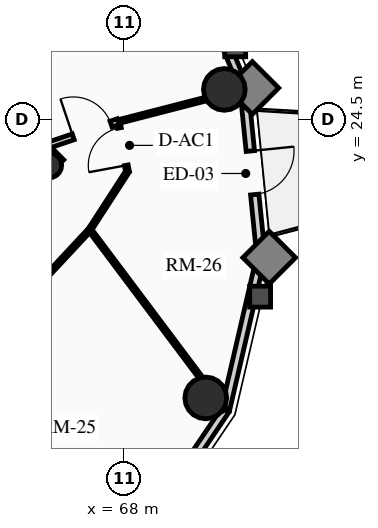
"""IFC4 building model, lengths in metres.
Left out: names, types, materials, properties, quantities, classifications, styles, units other than length and angle.
Written with IfcOpenShell. Run it as: python <this file> out.ifc"""

import sys

from ifc_helpers import new_model, si_unit, direction, frame, frame_2d, origin, origin_2d, place, context, subcontext, project, spatial, rectangle, circle, hollow_circle, extrude, source, transform, mapped, element, fill, save


model = new_model("IFC4")
c1 = context("Model", 3, precision=1e-05, world=origin(), true_north=direction((0.0, 1.0)))
c2 = subcontext(c1, "Body", "Model", "MODEL_VIEW")
j1 = project(units=[si_unit("LENGTHUNIT", "METRE"), si_unit("PLANEANGLEUNIT", "RADIAN")], contexts=[c1])
p1 = place(None, origin())
s1 = spatial("IfcSite", under=j1, at=p1, CompositionType="ELEMENT")
p2 = place(p1, origin())
s2 = spatial("IfcBuilding", under=s1, at=p2, CompositionType="ELEMENT")
p3 = place(p2, frame((0.0, 0.0, 196.66)))
s3 = spatial("IfcBuildingStorey", under=s2, at=p3, CompositionType="ELEMENT", Elevation=196.66)
p4 = place(p3, frame((66.268, 23.298, 0.0), z_axis=(0.0, 0.0, 1.0), x_axis=(-0.707106781187, 0.707106781187, 0.0)))
e1 = element("IfcWall", 1, at=p4, inside=s3, PredefinedType="SHEAR", context=c2, shape_type="SweptSolid", body=[
    extrude(rectangle(XDim=14.1, YDim=0.4, at=frame_2d((7.05, 0.0))), origin(), (0.0, 0.0, 1.0), 2.91),
])
p5 = place(p3, frame((58.561, 15.873, 0.0), z_axis=(0.0, 0.0, 1.0), x_axis=(0.707106781187, 0.707106781187, 0.0)))
e2 = element("IfcWall", 2, at=p5, inside=s3, PredefinedType="SHEAR", context=c2, shape_type="SweptSolid", body=[
    extrude(rectangle(XDim=10.7, YDim=0.4, at=frame_2d((5.35, 0.0))), origin(), (0.0, 0.0, 1.0), 2.91),
])
m1 = source(origin(), c2, "Body", "SweptSolid", [
    extrude(rectangle(XDim=1.5, YDim=2.02, at=frame_2d((0.75, 1.01))), frame((0.0, 0.21, 0.0), z_axis=(0.0, -1.0, 0.0), x_axis=(1.0, 0.0, 0.0)), (0.0, 0.0, 1.0), 0.42),
])
p6 = place(p5, frame((5.45, 0.0, 0.0)))
e3 = element("IfcOpeningElement", 3, at=p6, cuts=e2, PredefinedType="OPENING", context=c2, shape_type="MappedRepresentation", body=[
    mapped(m1, transform((0.0, 0.0, 0.0), x_axis=(1.0, 0.0, 0.0), y_axis=(0.0, 1.0, 0.0), z_axis=(0.0, 0.0, 1.0), scale=1.0)),
])
p7 = place(p3, frame((66.024, 23.294, 0.0), z_axis=(0.0, 0.0, 1.0), x_axis=(0.707106781187, 0.707106781187, 0.0)))
e4 = element("IfcColumn", 4, at=p7, inside=s3, PredefinedType="COLUMN", context=c2, shape_type="SweptSolid", body=[
    extrude(hollow_circle(Radius=0.33, WallThickness=0.025, at=origin_2d()), origin(), (0.0, 0.0, 1.0), 2.91),
])
for number, where, z_axis, x_axis in (
    (5, (70.146, 17.173, 0.0), (0.0, 0.0, 1.0), (1.0, 0.0, 0.0)),
    (6, (70.635, 25.291, 0.0), (0.0, 0.0, 1.0), (1.0, 0.0, 0.0)),
):
    element("IfcColumn", number, at=place(p3, frame(where, z_axis=z_axis, x_axis=x_axis)), inside=s3, PredefinedType="USERDEFINED", context=c2, shape_type="SweptSolid", body=[
        extrude(circle(Radius=0.55, at=origin_2d()), origin(), (0.0, 0.0, 1.0), 2.91),
    ])
p8 = place(p3, frame((70.663, 16.856, 0.0), z_axis=(0.0, 0.0, 1.0), x_axis=(-0.559495003079, -0.828833723692, 0.0)))
e7 = element("IfcWall", 7, at=p8, inside=s3, PredefinedType="SOLIDWALL", context=c2, shape_type="SweptSolid", body=[
    extrude(rectangle(XDim=3.976, YDim=0.22, at=frame_2d((1.988, 0.0))), origin(), (0.0, 0.0, 1.0), 2.322),
])
m2 = source(origin(), c2, "Body", "SweptSolid", [
    extrude(rectangle(XDim=1.05, YDim=1.3, at=frame_2d((0.525, 0.65))), frame((0.0, 0.12, 0.0), z_axis=(0.0, -1.0, 0.0), x_axis=(1.0, 0.0, 0.0)), (0.0, 0.0, 1.0), 0.24),
])
p9 = place(p8, frame((1.463, 0.0, 0.65)))
e8 = element("IfcOpeningElement", 8, at=p9, cuts=e7, PredefinedType="OPENING", context=c2, shape_type="MappedRepresentation", body=[
    mapped(m2, transform((0.0, 0.0, 0.0), x_axis=(1.0, 0.0, 0.0), y_axis=(0.0, 1.0, 0.0), z_axis=(0.0, 0.0, 1.0), scale=1.0)),
])
p10 = place(p3, frame((71.599, 20.9, 0.0), z_axis=(0.0, 0.0, 1.0), x_axis=(-0.225473813158, -0.974249228678, 0.0)))
e9 = element("IfcWall", 9, at=p10, inside=s3, PredefinedType="SOLIDWALL", context=c2, shape_type="SweptSolid", body=[
    extrude(rectangle(XDim=4.15, YDim=0.22, at=frame_2d((2.075, 0.0))), origin(), (0.0, 0.0, 1.0), 2.322),
])
p11 = place(p3, frame((71.155, 25.295, 0.0), z_axis=(0.0, 0.0, 1.0), x_axis=(0.100570534541, -0.994929930991, 0.0)))
e10 = element("IfcWall", 10, at=p11, inside=s3, PredefinedType="SOLIDWALL", context=c2, shape_type="SweptSolid", body=[
    extrude(rectangle(XDim=4.418, YDim=0.22, at=frame_2d((2.209, 0.0))), origin(), (0.0, 0.0, 1.0), 2.322),
])
m3 = source(origin(), c2, "Body", "SweptSolid", [
    extrude(rectangle(XDim=1.15, YDim=2.005, at=frame_2d((0.575, 1.002))), frame((0.0, 0.12, 0.0), z_axis=(0.0, -1.0, 0.0), x_axis=(1.0, 0.0, 0.0)), (0.0, 0.0, 1.0), 0.24),
])
p12 = place(p11, frame((1.634, 0.0, 0.0)))
e11 = element("IfcOpeningElement", 11, at=p12, cuts=e10, PredefinedType="OPENING", context=c2, shape_type="MappedRepresentation", body=[
    mapped(m3, transform((0.0, 0.0, 0.0), x_axis=(1.0, 0.0, 0.0), y_axis=(0.0, 1.0, 0.0), z_axis=(0.0, 0.0, 1.0), scale=1.0)),
])
p13 = place(p3, frame((69.374, 29.613, 0.0), z_axis=(0.0, 0.0, 1.0), x_axis=(0.381309704956, -0.924447353237, 0.0)))
e12 = element("IfcWall", 12, at=p13, inside=s3, PredefinedType="SOLIDWALL", context=c2, shape_type="SweptSolid", body=[
    extrude(rectangle(XDim=4.671, YDim=0.22, at=frame_2d((2.335, 0.0))), origin(), (0.0, 0.0, 1.0), 2.322),
])
p14 = place(p3, frame((62.736, 16.924, 0.0), z_axis=(0.0, 0.0, 1.0), x_axis=(0.681946700833, 0.731401871219, 0.0)))
e13 = element("IfcWall", 13, at=p14, inside=s3, PredefinedType="MOVABLE", context=c2, shape_type="SweptSolid", body=[
    extrude(rectangle(XDim=6.393, YDim=0.1, at=frame_2d((3.196, 0.0))), origin(), (0.0, 0.0, 1.0), 2.255),
])
p15 = place(p3, frame((67.095, 21.6, 0.0), z_axis=(0.0, 0.0, 1.0), x_axis=(0.543773190184, 0.839232219137, 0.0)))
e14 = element("IfcWall", 14, at=p15, inside=s3, PredefinedType="MOVABLE", context=c2, shape_type="SweptSolid", body=[
    extrude(rectangle(XDim=1.823, YDim=0.1, at=frame_2d((0.911, 0.0))), origin(), (0.0, 0.0, 1.0), 2.255),
])
p16 = place(p3, frame((68.086, 23.129, 0.0), z_axis=(0.0, 0.0, 1.0), x_axis=(-0.182004193146, 0.983297754334, 0.0)))
e15 = element("IfcWall", 15, at=p16, inside=s3, PredefinedType="MOVABLE", context=c2, shape_type="SweptSolid", body=[
    extrude(rectangle(XDim=1.336, YDim=0.1, at=frame_2d((0.668, 0.0))), origin(), (0.0, 0.0, 1.0), 2.322),
])
m4 = source(origin(), c2, "Body", "SweptSolid", [
    extrude(rectangle(XDim=1.0, YDim=2.015, at=frame_2d((0.5, 1.007))), frame((0.0, 0.06, 0.0), z_axis=(0.0, -1.0, 0.0), x_axis=(1.0, 0.0, 0.0)), (0.0, 0.0, 1.0), 0.12),
])
p17 = place(p16, frame((0.168, 0.0, 0.0)))
e16 = element("IfcOpeningElement", 16, at=p17, cuts=e15, PredefinedType="OPENING", context=c2, shape_type="MappedRepresentation", body=[
    mapped(m4, transform((0.0, 0.0, 0.0), x_axis=(1.0, 0.0, 0.0), y_axis=(0.0, 1.0, 0.0), z_axis=(0.0, 0.0, 1.0), scale=1.0)),
])
p18 = place(p3, frame((67.095, 21.6, 0.0), z_axis=(0.0, 0.0, 1.0), x_axis=(0.599947190798, -0.800039604178, 0.0)))
e17 = element("IfcWall", 17, at=p18, inside=s3, PredefinedType="MOVABLE", context=c2, shape_type="SweptSolid", body=[
    extrude(rectangle(XDim=5.918, YDim=0.1, at=frame_2d((2.959, 0.0))), origin(), (0.0, 0.0, 1.0), 2.322),
])
p19 = place(p3, frame((67.843, 24.443, 0.0), z_axis=(0.0, 0.0, 1.0), x_axis=(0.968303102463, 0.249778105048, 0.0)))
e18 = element("IfcWall", 18, at=p19, inside=s3, PredefinedType="MOVABLE", context=c2, shape_type="SweptSolid", body=[
    extrude(rectangle(XDim=3.399, YDim=0.1, at=frame_2d((1.7, 0.0))), origin(), (0.0, 0.0, 1.0), 2.322),
])
p20 = place(p3, frame((66.021, 23.828, 0.0), z_axis=(0.0, 0.0, 1.0), x_axis=(0.947522075691, 0.319690344049, 0.0)))
e19 = element("IfcWall", 19, at=p20, inside=s3, PredefinedType="PARTITIONING", context=c2, shape_type="SweptSolid", body=[
    extrude(rectangle(XDim=1.924, YDim=0.16, at=frame_2d((0.962, 0.0))), origin(), (0.0, 0.0, 1.0), 2.255),
])
m5 = source(origin(), c2, "Body", "SweptSolid", [
    extrude(rectangle(XDim=1.05, YDim=2.015, at=frame_2d((0.525, 1.007))), frame((0.0, 0.09, 0.0), z_axis=(0.0, -1.0, 0.0), x_axis=(1.0, 0.0, 0.0)), (0.0, 0.0, 1.0), 0.18),
])
p21 = place(p20, frame((0.674, 0.0, 0.0)))
e20 = element("IfcOpeningElement", 20, at=p21, cuts=e19, PredefinedType="OPENING", context=c2, shape_type="MappedRepresentation", body=[
    mapped(m5, transform((0.0, 0.0, 0.0), x_axis=(1.0, 0.0, 0.0), y_axis=(0.0, 1.0, 0.0), z_axis=(0.0, 0.0, 1.0), scale=1.0)),
])
m6 = source(origin(), c2, "Body", "SweptSolid", [
    extrude(rectangle(XDim=1.15, YDim=2.005, at=frame_2d((0.575, 1.002))), frame((0.0, 0.025, 0.0), z_axis=(0.0, -1.0, 0.0), x_axis=(1.0, 0.0, 0.0)), (0.0, 0.0, 1.0), 0.05),
])
p22 = place(p12, origin())
e21 = element("IfcDoor", 21, at=p22, inside=s3, OperationType="SINGLE_SWING_LEFT", PredefinedType="DOOR", context=c2, shape_type="MappedRepresentation", body=[
    mapped(m6, transform((0.0, 0.0, 0.0), x_axis=(1.0, 0.0, 0.0), y_axis=(0.0, 1.0, 0.0), z_axis=(0.0, 0.0, 1.0), scale=1.0)),
])
fill(e11, e21)
m7 = source(origin(), c2, "Body", "SweptSolid", [
    extrude(rectangle(XDim=1.05, YDim=2.015, at=frame_2d((0.525, 1.007))), frame((0.0, 0.025, 0.0), z_axis=(0.0, -1.0, 0.0), x_axis=(1.0, 0.0, 0.0)), (0.0, 0.0, 1.0), 0.05),
])
p23 = place(p21, origin())
e22 = element("IfcDoor", 22, at=p23, inside=s3, OperationType="SINGLE_SWING_LEFT", PredefinedType="DOOR", context=c2, shape_type="MappedRepresentation", body=[
    mapped(m7, transform((0.0, 0.0, 0.0), x_axis=(1.0, 0.0, 0.0), y_axis=(0.0, 1.0, 0.0), z_axis=(0.0, 0.0, 1.0), scale=1.0)),
])
fill(e20, e22)
m8 = source(origin(), c2, "Body", "SweptSolid", [
    extrude(rectangle(XDim=1.0, YDim=2.015, at=frame_2d((0.5, 1.007))), frame((0.0, 0.025, 0.0), z_axis=(0.0, -1.0, 0.0), x_axis=(1.0, 0.0, 0.0)), (0.0, 0.0, 1.0), 0.05),
])
p24 = place(p17, origin())
e23 = element("IfcDoor", 23, at=p24, inside=s3, OperationType="SINGLE_SWING_LEFT", PredefinedType="DOOR", context=c2, shape_type="MappedRepresentation", body=[
    mapped(m8, transform((0.0, 0.0, 0.0), x_axis=(1.0, 0.0, 0.0), y_axis=(0.0, 1.0, 0.0), z_axis=(0.0, 0.0, 1.0), scale=1.0)),
])
fill(e16, e23)
save(model, sys.argv[1])
